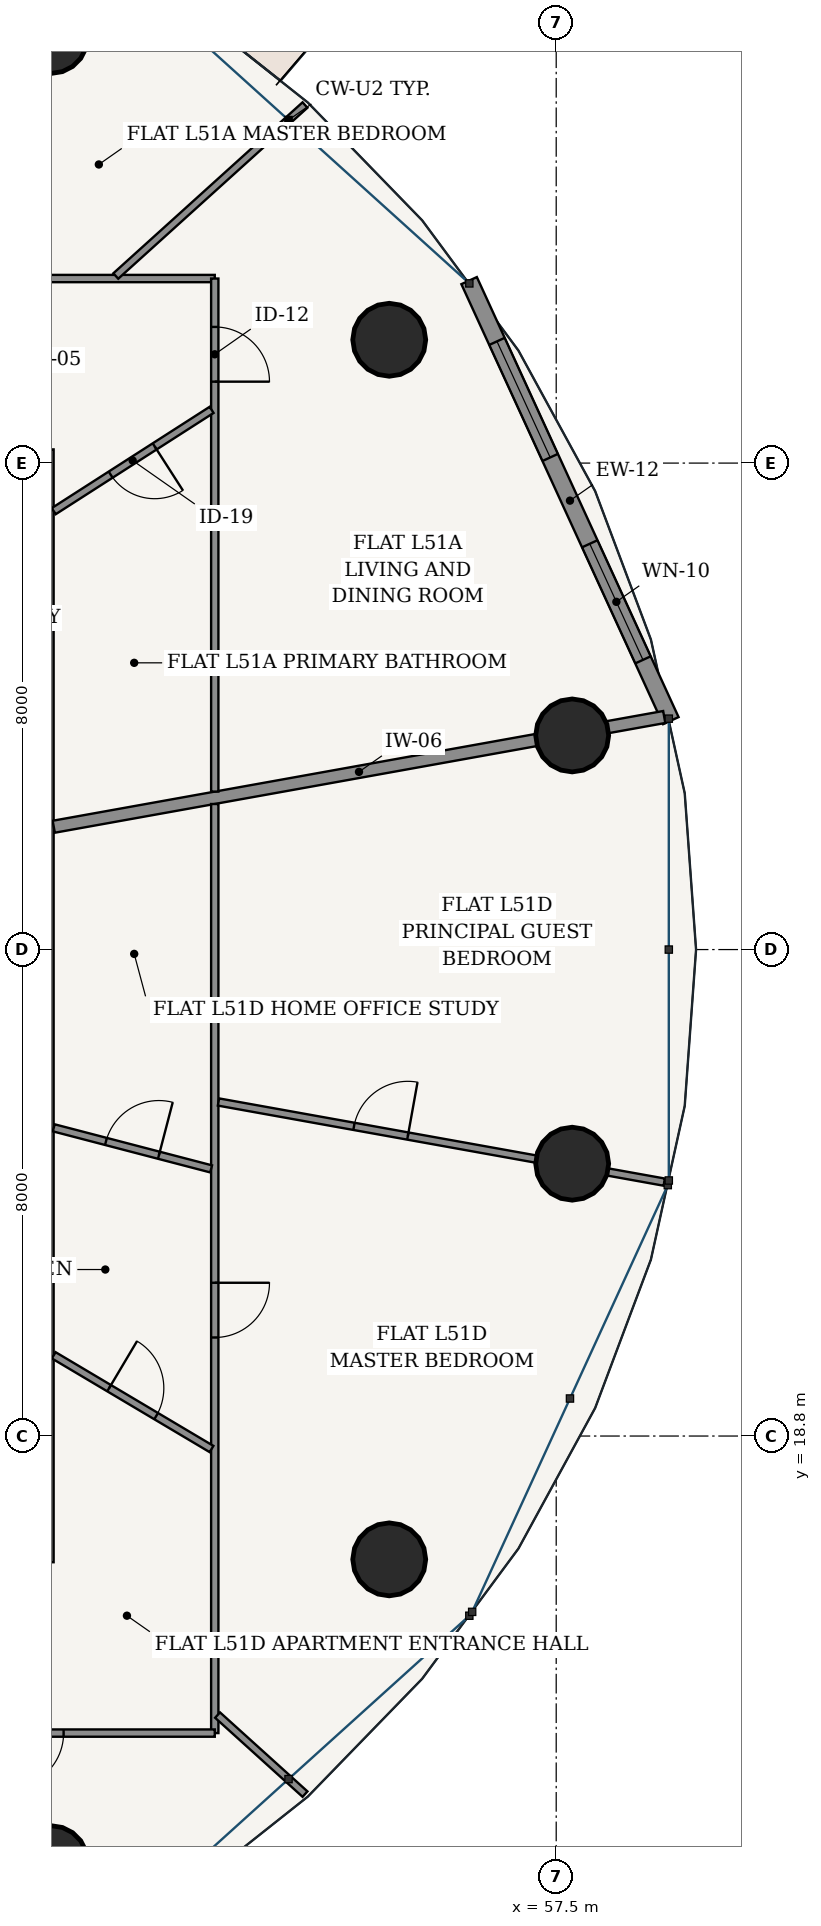
"""IFC4 building model, lengths in metres.
Left out: names, types, materials, properties, quantities, classifications, styles, units other than length and angle.
Written with IfcOpenShell. Run it as: python <this file> out.ifc"""

import sys

from ifc_helpers import new_model, si_unit, direction, frame, frame_2d, origin, origin_2d, place, context, subcontext, project, spatial, rectangle, hollow_circle, extrude, source, transform, mapped, element, fill, save


model = new_model("IFC4")
c1 = context("Model", 3, precision=1e-05, world=origin(), true_north=direction((-0.2419218956, 0.970295726276)))
c2 = subcontext(c1, "Body", "Model", "MODEL_VIEW")
j1 = project(units=[si_unit("LENGTHUNIT", "METRE"), si_unit("PLANEANGLEUNIT", "RADIAN")], contexts=[c1])
p1 = place(None, origin())
s1 = spatial("IfcSite", under=j1, at=p1, CompositionType="ELEMENT")
p2 = place(p1, origin())
s2 = spatial("IfcBuilding", under=s1, at=p2, CompositionType="ELEMENT")
p3 = place(p2, frame((0.0, 0.0, 194.9)))
s3 = spatial("IfcBuildingStorey", under=s2, at=p3, CompositionType="ELEMENT", Elevation=194.9)
for number, where, z_axis, x_axis in (
    (1, (57.763, 30.321, 0.0), (0.0, 0.0, 1.0), (1.0, 0.0, 0.0)),
    (2, (54.754, 36.828, 0.0), (0.0, 0.0, 1.0), (1.0, 0.0, 0.0)),
    (3, (49.195, 41.808, 0.0), (0.0, 0.0, 1.0), (1.0, 0.0, 0.0)),
    (4, (49.195, 11.792, 0.0), (0.0, 0.0, 1.0), (1.0, 0.0, 0.0)),
    (5, (54.754, 16.772, 0.0), (0.0, 0.0, 1.0), (1.0, 0.0, 0.0)),
    (6, (57.763, 23.279, 0.0), (0.0, 0.0, 1.0), (1.0, 0.0, 0.0)),
):
    element("IfcColumn", number, at=place(p3, frame(where, z_axis=z_axis, x_axis=x_axis)), inside=s3, PredefinedType="COLUMN", context=c2, shape_type="SweptSolid", body=[
        extrude(hollow_circle(Radius=0.6, WallThickness=0.038, at=origin_2d()), origin(), (0.0, 0.0, 1.0), 3.7),
    ])
p4 = place(p3, frame((59.385, 30.565, 0.0), z_axis=(0.0, 0.0, 1.0), x_axis=(-0.416717018135, 0.909036262641, 0.0)))
e7 = element("IfcWall", 7, at=p4, inside=s3, PredefinedType="SOLIDWALL", context=c2, shape_type="SweptSolid", body=[
    extrude(rectangle(XDim=7.96, YDim=0.28, at=frame_2d((3.98, 0.0))), origin(), (0.0, 0.0, 1.0), 3.435),
])
p5 = place(p4, frame((1.099, 0.0, 0.85)))
e8 = element("IfcOpeningElement", 8, at=p5, cuts=e7, PredefinedType="OPENING", context=c2, shape_type="SweptSolid", body=[
    extrude(rectangle(XDim=2.1, YDim=1.95, at=frame_2d((1.05, 0.975))), frame((0.0, 0.15, 0.0), z_axis=(0.0, -1.0, 0.0), x_axis=(1.0, 0.0, 0.0)), (0.0, 0.0, 1.0), 0.3),
])
p6 = place(p4, frame((4.761, 0.0, 0.85)))
e9 = element("IfcOpeningElement", 9, at=p6, cuts=e7, PredefinedType="OPENING", context=c2, shape_type="SweptSolid", body=[
    extrude(rectangle(XDim=2.1, YDim=1.95, at=frame_2d((1.05, 0.975))), frame((0.0, 0.15, 0.0), z_axis=(0.0, -1.0, 0.0), x_axis=(1.0, 0.0, 0.0)), (0.0, 0.0, 1.0), 0.3),
])
p7 = place(p3, frame((49.155, 16.725, 0.0), z_axis=(0.0, 0.0, 1.0), x_axis=(0.0, 1.0, 0.0)))
e10 = element("IfcWall", 10, at=p7, inside=s3, PredefinedType="PARTITIONING", context=c2, shape_type="SweptSolid", body=[
    extrude(rectangle(XDim=18.3, YDim=0.16, at=frame_2d((9.15, 0.0))), origin(), (0.0, 0.0, 1.0), 2.951),
])
p8 = place(p3, frame((49.237, 28.82, 0.0), z_axis=(0.0, 0.0, 1.0), x_axis=(0.984224859606, 0.176922089446, 0.0)))
e11 = element("IfcWall", 11, at=p8, inside=s3, PredefinedType="PARTITIONING", context=c2, shape_type="SweptSolid", body=[
    extrude(rectangle(XDim=10.2, YDim=0.2, at=frame_2d((5.1, 0.0))), origin(), (0.0, 0.0, 1.0), 2.951),
])
p9 = place(p3, frame((44.415, 37.835, 0.0), z_axis=(0.0, 0.0, 1.0), x_axis=(1.0, 0.0, 0.0)))
e12 = element("IfcWall", 12, at=p9, inside=s3, PredefinedType="PARTITIONING", context=c2, shape_type="SweptSolid", body=[
    extrude(rectangle(XDim=7.47, YDim=0.12, at=frame_2d((3.735, 0.0))), origin(), (0.0, 0.0, 1.0), 2.951),
])
p10 = place(p9, frame((3.379, 0.0, 0.0)))
e13 = element("IfcOpeningElement", 13, at=p10, cuts=e12, PredefinedType="OPENING", context=c2, shape_type="SweptSolid", body=[
    extrude(rectangle(XDim=0.9, YDim=2.15, at=frame_2d((0.45, 1.075))), frame((0.0, 0.07, 0.0), z_axis=(0.0, -1.0, 0.0), x_axis=(1.0, 0.0, 0.0)), (0.0, 0.0, 1.0), 0.14),
])
p11 = place(p3, frame((51.885, 37.835, 0.0), z_axis=(0.0, 0.0, 1.0), x_axis=(0.0, -1.0, 0.0)))
e14 = element("IfcWall", 14, at=p11, inside=s3, PredefinedType="PARTITIONING", context=c2, shape_type="SweptSolid", body=[
    extrude(rectangle(XDim=8.437, YDim=0.12, at=frame_2d((4.219, 0.0))), origin(), (0.0, 0.0, 1.0), 2.951),
])
p12 = place(p11, frame((0.796, 0.0, 0.0)))
e15 = element("IfcOpeningElement", 15, at=p12, cuts=e14, PredefinedType="OPENING", context=c2, shape_type="SweptSolid", body=[
    extrude(rectangle(XDim=0.9, YDim=2.15, at=frame_2d((0.45, 1.075))), frame((0.0, 0.07, 0.0), z_axis=(0.0, -1.0, 0.0), x_axis=(1.0, 0.0, 0.0)), (0.0, 0.0, 1.0), 0.14),
])
p13 = place(p3, frame((50.257, 37.876, 0.0), z_axis=(0.0, 0.0, 1.0), x_axis=(0.741943837234, 0.670462036502, 0.0)))
e16 = element("IfcWall", 16, at=p13, inside=s3, PredefinedType="PARTITIONING", context=c2, shape_type="SweptSolid", body=[
    extrude(rectangle(XDim=4.194, YDim=0.12, at=frame_2d((2.097, 0.0))), origin(), (0.0, 0.0, 1.0), 2.951),
])
p14 = place(p3, frame((46.196, 37.885, 0.0), z_axis=(0.0, 0.0, 1.0), x_axis=(0.594507557292, 0.804090022524, 0.0)))
e17 = element("IfcWall", 17, at=p14, inside=s3, PredefinedType="PARTITIONING", context=c2, shape_type="SweptSolid", body=[
    extrude(rectangle(XDim=6.481, YDim=0.12, at=frame_2d((3.241, 0.0))), origin(), (0.0, 0.0, 1.0), 2.951),
])
p15 = place(p3, frame((49.237, 34.009, 0.0), z_axis=(0.0, 0.0, 1.0), x_axis=(0.841651322174, 0.540021343915, 0.0)))
e18 = element("IfcWall", 18, at=p15, inside=s3, PredefinedType="PARTITIONING", context=c2, shape_type="SweptSolid", body=[
    extrude(rectangle(XDim=3.085, YDim=0.12, at=frame_2d((1.542, 0.0))), origin(), (0.0, 0.0, 1.0), 3.11),
])
p16 = place(p15, frame((1.112, 0.0, 0.0)))
e19 = element("IfcOpeningElement", 19, at=p16, cuts=e18, PredefinedType="OPENING", context=c2, shape_type="SweptSolid", body=[
    extrude(rectangle(XDim=0.86, YDim=2.15, at=frame_2d((0.43, 1.075))), frame((0.0, 0.07, 0.0), z_axis=(0.0, -1.0, 0.0), x_axis=(1.0, 0.0, 0.0)), (0.0, 0.0, 1.0), 0.14),
])
p17 = place(p3, frame((51.885, 29.194, 0.0), z_axis=(0.0, 0.0, 1.0), x_axis=(0.0, -1.0, 0.0)))
e20 = element("IfcWall", 20, at=p17, inside=s3, PredefinedType="PARTITIONING", context=c2, shape_type="SweptSolid", body=[
    extrude(rectangle(XDim=15.279, YDim=0.12, at=frame_2d((7.639, 0.0))), origin(), (0.0, 0.0, 1.0), 2.951),
])
p18 = place(p17, frame((7.873, 0.0, 0.0)))
e21 = element("IfcOpeningElement", 21, at=p18, cuts=e20, PredefinedType="OPENING", context=c2, shape_type="SweptSolid", body=[
    extrude(rectangle(XDim=0.9, YDim=2.15, at=frame_2d((0.45, 1.075))), frame((0.0, 0.07, 0.0), z_axis=(0.0, -1.0, 0.0), x_axis=(1.0, 0.0, 0.0)), (0.0, 0.0, 1.0), 0.14),
])
p19 = place(p3, frame((51.885, 13.915, 0.0), z_axis=(0.0, 0.0, 1.0), x_axis=(-1.0, 0.0, 0.0)))
e22 = element("IfcWall", 22, at=p19, inside=s3, PredefinedType="PARTITIONING", context=c2, shape_type="SweptSolid", body=[
    extrude(rectangle(XDim=10.947, YDim=0.12, at=frame_2d((5.473, 0.0))), origin(), (0.0, 0.0, 1.0), 2.951),
])
p20 = place(p19, frame((2.486, 0.0, 0.0)))
e23 = element("IfcOpeningElement", 23, at=p20, cuts=e22, PredefinedType="OPENING", context=c2, shape_type="SweptSolid", body=[
    extrude(rectangle(XDim=0.9, YDim=2.15, at=frame_2d((0.45, 1.075))), frame((0.0, 0.07, 0.0), z_axis=(0.0, -1.0, 0.0), x_axis=(1.0, 0.0, 0.0)), (0.0, 0.0, 1.0), 0.14),
])
p21 = place(p3, frame((51.931, 14.211, 0.0), z_axis=(0.0, 0.0, 1.0), x_axis=(0.741971265209, -0.670431683026, 0.0)))
e24 = element("IfcWall", 24, at=p21, inside=s3, PredefinedType="PARTITIONING", context=c2, shape_type="SweptSolid", body=[
    extrude(rectangle(XDim=1.938, YDim=0.12, at=frame_2d((0.969, 0.0))), origin(), (0.0, 0.0, 1.0), 2.951),
])
p22 = place(p3, frame((51.946, 24.293, 0.0), z_axis=(0.0, 0.0, 1.0), x_axis=(0.984227185588, -0.176909149424, 0.0)))
e25 = element("IfcWall", 25, at=p22, inside=s3, PredefinedType="PARTITIONING", context=c2, shape_type="SweptSolid", body=[
    extrude(rectangle(XDim=7.448, YDim=0.12, at=frame_2d((3.724, 0.0))), origin(), (0.0, 0.0, 1.0), 2.951),
])
p23 = place(p22, frame((2.264, 0.0, 0.0)))
e26 = element("IfcOpeningElement", 26, at=p23, cuts=e25, PredefinedType="OPENING", context=c2, shape_type="SweptSolid", body=[
    extrude(rectangle(XDim=0.9, YDim=2.15, at=frame_2d((0.45, 1.075))), frame((0.0, 0.07, 0.0), z_axis=(0.0, -1.0, 0.0), x_axis=(1.0, 0.0, 0.0)), (0.0, 0.0, 1.0), 0.14),
])
p24 = place(p3, frame((49.237, 20.128, 0.0), z_axis=(0.0, 0.0, 1.0), x_axis=(0.859818120481, -0.510600430565, 0.0)))
e27 = element("IfcWall", 27, at=p24, inside=s3, PredefinedType="PARTITIONING", context=c2, shape_type="SweptSolid", body=[
    extrude(rectangle(XDim=3.018, YDim=0.12, at=frame_2d((1.509, 0.0))), origin(), (0.0, 0.0, 1.0), 2.951),
])
p25 = place(p24, frame((1.059, 0.0, 0.0)))
e28 = element("IfcOpeningElement", 28, at=p25, cuts=e27, PredefinedType="OPENING", context=c2, shape_type="SweptSolid", body=[
    extrude(rectangle(XDim=0.9, YDim=2.15, at=frame_2d((0.45, 1.075))), frame((0.0, 0.07, 0.0), z_axis=(0.0, -1.0, 0.0), x_axis=(1.0, 0.0, 0.0)), (0.0, 0.0, 1.0), 0.14),
])
p26 = place(p3, frame((49.237, 23.868, 0.0), z_axis=(0.0, 0.0, 1.0), x_axis=(0.967622119215, -0.252403316946, 0.0)))
e29 = element("IfcWall", 29, at=p26, inside=s3, PredefinedType="PARTITIONING", context=c2, shape_type="SweptSolid", body=[
    extrude(rectangle(XDim=2.675, YDim=0.12, at=frame_2d((1.337, 0.0))), origin(), (0.0, 0.0, 1.0), 3.435),
])
p27 = place(p26, frame((0.887, 0.0, 0.0)))
e30 = element("IfcOpeningElement", 30, at=p27, cuts=e29, PredefinedType="OPENING", context=c2, shape_type="SweptSolid", body=[
    extrude(rectangle(XDim=0.9, YDim=2.15, at=frame_2d((0.45, 1.075))), frame((0.0, 0.07, 0.0), z_axis=(0.0, -1.0, 0.0), x_axis=(1.0, 0.0, 0.0)), (0.0, 0.0, 1.0), 0.14),
])
m1 = source(origin(), c2, "Body", "SweptSolid", [
    extrude(rectangle(XDim=2.1, YDim=1.95, at=frame_2d((1.05, 0.975))), frame((0.0, 0.03, 0.0), z_axis=(0.0, -1.0, 0.0), x_axis=(1.0, 0.0, 0.0)), (0.0, 0.0, 1.0), 0.06),
])
p28 = place(p5, origin())
e31 = element("IfcWindow", 31, at=p28, inside=s3, PartitioningType="SINGLE_PANEL", PredefinedType="WINDOW", context=c2, shape_type="MappedRepresentation", body=[
    mapped(m1, transform((0.0, 0.0, 0.0), scale=1.0)),
])
fill(e8, e31)
p29 = place(p6, origin())
e32 = element("IfcWindow", 32, at=p29, inside=s3, PartitioningType="SINGLE_PANEL", PredefinedType="WINDOW", context=c2, shape_type="MappedRepresentation", body=[
    mapped(m1, transform((0.0, 0.0, 0.0), scale=1.0)),
])
fill(e9, e32)
m2 = source(origin(), c2, "Body", "SweptSolid", [
    extrude(rectangle(XDim=0.86, YDim=2.15, at=frame_2d((0.43, 1.075))), frame((0.0, 0.025, 0.0), z_axis=(0.0, -1.0, 0.0), x_axis=(1.0, 0.0, 0.0)), (0.0, 0.0, 1.0), 0.05),
])
p30 = place(p16, frame((0.86, 0.0, 0.0), z_axis=(0.0, 0.0, 1.0), x_axis=(-1.0, 0.0, 0.0)))
e33 = element("IfcDoor", 33, at=p30, inside=s3, OperationType="SINGLE_SWING_LEFT", PredefinedType="DOOR", context=c2, shape_type="MappedRepresentation", body=[
    mapped(m2, transform((0.0, 0.0, 0.0), scale=1.0)),
])
fill(e19, e33)
m3 = source(origin(), c2, "Body", "SweptSolid", [
    extrude(rectangle(XDim=0.9, YDim=2.15, at=frame_2d((0.45, 1.075))), frame((0.0, 0.025, 0.0), z_axis=(0.0, -1.0, 0.0), x_axis=(1.0, 0.0, 0.0)), (0.0, 0.0, 1.0), 0.05),
])
p31 = place(p12, origin())
e34 = element("IfcDoor", 34, at=p31, inside=s3, OperationType="SINGLE_SWING_RIGHT", PredefinedType="DOOR", context=c2, shape_type="MappedRepresentation", body=[
    mapped(m3, transform((0.0, 0.0, 0.0), scale=1.0)),
])
fill(e15, e34)
p32 = place(p20, origin())
e35 = element("IfcDoor", 35, at=p32, inside=s3, OperationType="SINGLE_SWING_RIGHT", PredefinedType="DOOR", context=c2, shape_type="MappedRepresentation", body=[
    mapped(m3, transform((0.0, 0.0, 0.0), scale=1.0)),
])
fill(e23, e35)
p33 = place(p25, origin())
e36 = element("IfcDoor", 36, at=p33, inside=s3, OperationType="SINGLE_SWING_LEFT", PredefinedType="DOOR", context=c2, shape_type="MappedRepresentation", body=[
    mapped(m3, transform((0.0, 0.0, 0.0), scale=1.0)),
])
fill(e28, e36)
p34 = place(p27, origin())
e37 = element("IfcDoor", 37, at=p34, inside=s3, OperationType="SINGLE_SWING_RIGHT", PredefinedType="DOOR", context=c2, shape_type="MappedRepresentation", body=[
    mapped(m3, transform((0.0, 0.0, 0.0), scale=1.0)),
])
fill(e30, e37)
p35 = place(p18, origin())
e38 = element("IfcDoor", 38, at=p35, inside=s3, OperationType="SINGLE_SWING_LEFT", PredefinedType="DOOR", context=c2, shape_type="MappedRepresentation", body=[
    mapped(m3, transform((0.0, 0.0, 0.0), scale=1.0)),
])
fill(e21, e38)
p36 = place(p23, origin())
e39 = element("IfcDoor", 39, at=p36, inside=s3, OperationType="SINGLE_SWING_RIGHT", PredefinedType="DOOR", context=c2, shape_type="MappedRepresentation", body=[
    mapped(m3, transform((0.0, 0.0, 0.0), scale=1.0)),
])
fill(e26, e39)
save(model, sys.argv[1])
